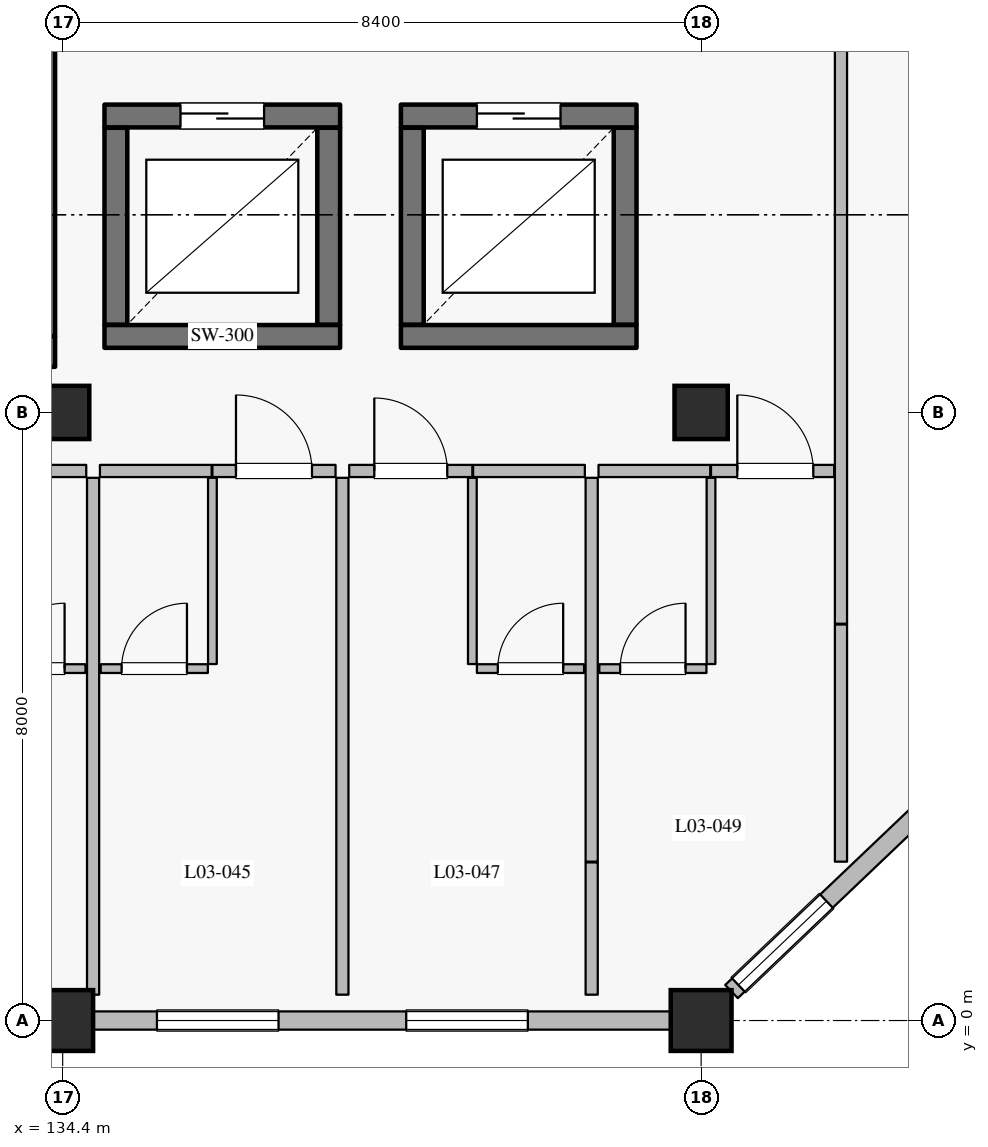
"""IFC4 building model, lengths in metres.
Left out: names, types, materials, properties, quantities, classifications, styles, units other than length and angle.
Written with IfcOpenShell. Run it as: python <this file> out.ifc"""

import sys

from ifc_helpers import new_model, si_unit, direction, frame, frame_2d, origin, origin_2d, place, context, subcontext, project, spatial, rectangle, extrude, element, fill, save


model = new_model("IFC4")
c1 = context("Model", 3, precision=1e-05, world=origin(), true_north=direction((0.0, 1.0)))
c2 = subcontext(c1, "Body", "Model", "MODEL_VIEW")
j1 = project(units=[si_unit("LENGTHUNIT", "METRE"), si_unit("PLANEANGLEUNIT", "RADIAN")], contexts=[c1])
p1 = place(None, origin())
s1 = spatial("IfcSite", under=j1, at=p1, CompositionType="ELEMENT")
p2 = place(p1, origin())
s2 = spatial("IfcBuilding", under=s1, at=p2, CompositionType="ELEMENT")
p3 = place(p2, frame((0.0, 0.0, 16.2)))
s3 = spatial("IfcBuildingStorey", under=s2, at=p3, CompositionType="ELEMENT", Elevation=16.2)
for number, where, z_axis, x_axis in (
    (1, (134.4, 0.0, 0.0), (0.0, 0.0, 1.0), (1.0, 0.0, 0.0)),
    (2, (142.8, 0.0, 0.0), (0.0, 0.0, 1.0), (1.0, 0.0, 0.0)),
):
    element("IfcColumn", number, at=place(p3, frame(where, z_axis=z_axis, x_axis=x_axis)), inside=s3, PredefinedType="COLUMN", context=c2, shape_type="SweptSolid", body=[
        extrude(rectangle(XDim=0.8, YDim=0.8, at=origin_2d()), origin(), (0.0, 0.0, 1.0), 4.8),
    ])
for number, where, z_axis, x_axis in (
    (3, (134.4, 8.0, 0.0), (0.0, 0.0, 1.0), (1.0, 0.0, 0.0)),
    (4, (142.8, 8.0, 0.0), (0.0, 0.0, 1.0), (1.0, 0.0, 0.0)),
):
    element("IfcColumn", number, at=place(p3, frame(where, z_axis=z_axis, x_axis=x_axis)), inside=s3, PredefinedType="COLUMN", context=c2, shape_type="SweptSolid", body=[
        extrude(rectangle(XDim=0.7, YDim=0.7, at=origin_2d()), origin(), (0.0, 0.0, 1.0), 4.8),
    ])
p4 = place(p3, frame((142.4, 0.0, 0.0), z_axis=(0.0, 0.0, 1.0), x_axis=(-1.0, 0.0, 0.0)))
e5 = element("IfcWall", 5, at=p4, inside=s3, PredefinedType="SOLIDWALL", context=c2, shape_type="SweptSolid", body=[
    extrude(rectangle(XDim=7.6, YDim=0.24, at=frame_2d((3.8, 0.0))), origin(), (0.0, 0.0, 1.0), 4.13),
])
p5 = place(p4, frame((1.88, 0.0, 0.8)))
e6 = element("IfcOpeningElement", 6, at=p5, cuts=e5, PredefinedType="OPENING", context=c2, shape_type="SweptSolid", body=[
    extrude(rectangle(XDim=1.6, YDim=1.6, at=frame_2d((0.8, 0.8))), frame((0.0, 0.13, 0.0), z_axis=(0.0, -1.0, 0.0), x_axis=(1.0, 0.0, 0.0)), (0.0, 0.0, 1.0), 0.26),
])
p6 = place(p4, frame((5.16, 0.0, 0.8)))
e7 = element("IfcOpeningElement", 7, at=p6, cuts=e5, PredefinedType="OPENING", context=c2, shape_type="SweptSolid", body=[
    extrude(rectangle(XDim=1.6, YDim=1.6, at=frame_2d((0.8, 0.8))), frame((0.0, 0.13, 0.0), z_axis=(0.0, -1.0, 0.0), x_axis=(1.0, 0.0, 0.0)), (0.0, 0.0, 1.0), 0.26),
])
p7 = place(p3, frame((150.8, 7.619, 0.0), z_axis=(0.0, 0.0, 1.0), x_axis=(-0.724156739794, -0.689635422677, 0.0)))
e8 = element("IfcWall", 8, at=p7, inside=s3, PredefinedType="SOLIDWALL", context=c2, shape_type="SweptSolid", body=[
    extrude(rectangle(XDim=10.495, YDim=0.24, at=frame_2d((5.248, 0.0))), origin(), (0.0, 0.0, 1.0), 4.13),
])
p8 = place(p7, frame((1.12, 0.0, 0.8)))
e9 = element("IfcOpeningElement", 9, at=p8, cuts=e8, PredefinedType="OPENING", context=c2, shape_type="SweptSolid", body=[
    extrude(rectangle(XDim=1.6, YDim=1.6, at=frame_2d((0.8, 0.8))), frame((0.0, 0.13, 0.0), z_axis=(0.0, -1.0, 0.0), x_axis=(1.0, 0.0, 0.0)), (0.0, 0.0, 1.0), 0.26),
])
p9 = place(p7, frame((5.442, 0.0, 0.8)))
e10 = element("IfcOpeningElement", 10, at=p9, cuts=e8, PredefinedType="OPENING", context=c2, shape_type="SweptSolid", body=[
    extrude(rectangle(XDim=1.6, YDim=1.6, at=frame_2d((0.8, 0.8))), frame((0.0, 0.13, 0.0), z_axis=(0.0, -1.0, 0.0), x_axis=(1.0, 0.0, 0.0)), (0.0, 0.0, 1.0), 0.26),
])
p10 = place(p7, frame((8.77, 0.0, 0.8)))
e11 = element("IfcOpeningElement", 11, at=p10, cuts=e8, PredefinedType="OPENING", context=c2, shape_type="SweptSolid", body=[
    extrude(rectangle(XDim=1.6, YDim=1.6, at=frame_2d((0.8, 0.8))), frame((0.0, 0.13, 0.0), z_axis=(0.0, -1.0, 0.0), x_axis=(1.0, 0.0, 0.0)), (0.0, 0.0, 1.0), 0.26),
])
p11 = place(p3, frame((134.95, 9.0, 0.0), z_axis=(0.0, 0.0, 1.0), x_axis=(1.0, 0.0, 0.0)))
e12 = element("IfcWall", 12, at=p11, inside=s3, PredefinedType="SHEAR", context=c2, shape_type="SweptSolid", body=[
    extrude(rectangle(XDim=3.1, YDim=0.3, at=frame_2d((1.55, 0.0))), origin(), (0.0, 0.0, 1.0), 4.535),
])
p12 = place(p3, frame((137.9, 9.155, 0.0), z_axis=(0.0, 0.0, 1.0), x_axis=(0.0, 1.0, 0.0)))
e13 = element("IfcWall", 13, at=p12, inside=s3, PredefinedType="SHEAR", context=c2, shape_type="SweptSolid", body=[
    extrude(rectangle(XDim=2.59, YDim=0.3, at=frame_2d((1.295, 0.0))), origin(), (0.0, 0.0, 1.0), 4.535),
])
p13 = place(p3, frame((138.05, 11.9, 0.0), z_axis=(0.0, 0.0, 1.0), x_axis=(-1.0, 0.0, 0.0)))
e14 = element("IfcWall", 14, at=p13, inside=s3, PredefinedType="SHEAR", context=c2, shape_type="SweptSolid", body=[
    extrude(rectangle(XDim=3.1, YDim=0.3, at=frame_2d((1.55, 0.0))), origin(), (0.0, 0.0, 1.0), 4.535),
])
p14 = place(p13, frame((1.0, 0.0, 0.0)))
e15 = element("IfcOpeningElement", 15, at=p14, cuts=e14, PredefinedType="OPENING", context=c2, shape_type="SweptSolid", body=[
    extrude(rectangle(XDim=1.1, YDim=2.2, at=frame_2d((0.55, 1.1))), frame((0.0, 0.16, 0.0), z_axis=(0.0, -1.0, 0.0), x_axis=(1.0, 0.0, 0.0)), (0.0, 0.0, 1.0), 0.32),
])
p15 = place(p3, frame((135.1, 11.745, 0.0), z_axis=(0.0, 0.0, 1.0), x_axis=(0.0, -1.0, 0.0)))
e16 = element("IfcWall", 16, at=p15, inside=s3, PredefinedType="SHEAR", context=c2, shape_type="SweptSolid", body=[
    extrude(rectangle(XDim=2.59, YDim=0.3, at=frame_2d((1.295, 0.0))), origin(), (0.0, 0.0, 1.0), 4.535),
])
p16 = place(p3, frame((138.85, 9.0, 0.0), z_axis=(0.0, 0.0, 1.0), x_axis=(1.0, 0.0, 0.0)))
e17 = element("IfcWall", 17, at=p16, inside=s3, PredefinedType="SHEAR", context=c2, shape_type="SweptSolid", body=[
    extrude(rectangle(XDim=3.1, YDim=0.3, at=frame_2d((1.55, 0.0))), origin(), (0.0, 0.0, 1.0), 4.535),
])
p17 = place(p3, frame((141.8, 9.155, 0.0), z_axis=(0.0, 0.0, 1.0), x_axis=(0.0, 1.0, 0.0)))
e18 = element("IfcWall", 18, at=p17, inside=s3, PredefinedType="SHEAR", context=c2, shape_type="SweptSolid", body=[
    extrude(rectangle(XDim=2.59, YDim=0.3, at=frame_2d((1.295, 0.0))), origin(), (0.0, 0.0, 1.0), 4.535),
])
p18 = place(p3, frame((141.95, 11.9, 0.0), z_axis=(0.0, 0.0, 1.0), x_axis=(-1.0, 0.0, 0.0)))
e19 = element("IfcWall", 19, at=p18, inside=s3, PredefinedType="SHEAR", context=c2, shape_type="SweptSolid", body=[
    extrude(rectangle(XDim=3.1, YDim=0.3, at=frame_2d((1.55, 0.0))), origin(), (0.0, 0.0, 1.0), 4.535),
])
p19 = place(p18, frame((1.0, 0.0, 0.0)))
e20 = element("IfcOpeningElement", 20, at=p19, cuts=e19, PredefinedType="OPENING", context=c2, shape_type="SweptSolid", body=[
    extrude(rectangle(XDim=1.1, YDim=2.2, at=frame_2d((0.55, 1.1))), frame((0.0, 0.16, 0.0), z_axis=(0.0, -1.0, 0.0), x_axis=(1.0, 0.0, 0.0)), (0.0, 0.0, 1.0), 0.32),
])
p20 = place(p3, frame((139.0, 11.745, 0.0), z_axis=(0.0, 0.0, 1.0), x_axis=(0.0, -1.0, 0.0)))
e21 = element("IfcWall", 21, at=p20, inside=s3, PredefinedType="SHEAR", context=c2, shape_type="SweptSolid", body=[
    extrude(rectangle(XDim=2.59, YDim=0.3, at=frame_2d((1.295, 0.0))), origin(), (0.0, 0.0, 1.0), 4.535),
])
p21 = place(p3, frame((126.1, 8.8, 0.0), z_axis=(0.0, 0.0, 1.0), x_axis=(1.0, 0.0, 0.0)))
e22 = element("IfcWall", 22, at=p21, inside=s3, PredefinedType="SHEAR", context=c2, shape_type="SweptSolid", body=[
    extrude(rectangle(XDim=8.2, YDim=0.4, at=frame_2d((4.1, 0.0))), origin(), (0.0, 0.0, 1.0), 4.535),
])
p22 = place(p3, frame((134.1, 9.005, 0.0), z_axis=(0.0, 0.0, 1.0), x_axis=(0.0, 1.0, 0.0)))
e23 = element("IfcWall", 23, at=p22, inside=s3, PredefinedType="SHEAR", context=c2, shape_type="SweptSolid", body=[
    extrude(rectangle(XDim=3.95, YDim=0.4, at=frame_2d((1.975, 0.0))), origin(), (0.0, 0.0, 1.0), 4.535),
])
p23 = place(p3, frame((133.24, 7.23, 0.0), z_axis=(0.0, 0.0, 1.0), x_axis=(1.0, 0.0, 0.0)))
e24 = element("IfcWall", 24, at=p23, inside=s3, PredefinedType="PARTITIONING", context=c2, shape_type="SweptSolid", body=[
    extrude(rectangle(XDim=1.47, YDim=0.16, at=frame_2d((0.735, 0.0))), origin(), (0.0, 0.0, 1.0), 4.535),
])
p24 = place(p3, frame((133.29, 4.63, 0.0), z_axis=(0.0, 0.0, 1.0), x_axis=(1.0, 0.0, 0.0)))
e25 = element("IfcWall", 25, at=p24, inside=s3, PredefinedType="PARTITIONING", context=c2, shape_type="SweptSolid", body=[
    extrude(rectangle(XDim=1.41, YDim=0.115, at=frame_2d((0.705, 0.0))), origin(), (0.0, 0.0, 1.0), 4.535),
])
p25 = place(p24, frame((0.275, 0.0, 0.0)))
e26 = element("IfcOpeningElement", 26, at=p25, cuts=e25, PredefinedType="OPENING", context=c2, shape_type="SweptSolid", body=[
    extrude(rectangle(XDim=0.86, YDim=2.12, at=frame_2d((0.43, 1.06))), frame((0.0, 0.067, 0.0), z_axis=(0.0, -1.0, 0.0), x_axis=(1.0, 0.0, 0.0)), (0.0, 0.0, 1.0), 0.135),
])
p26 = place(p3, frame((134.89, 7.23, 0.0), z_axis=(0.0, 0.0, 1.0), x_axis=(1.0, 0.0, 0.0)))
e27 = element("IfcWall", 27, at=p26, inside=s3, PredefinedType="PARTITIONING", context=c2, shape_type="SweptSolid", body=[
    extrude(rectangle(XDim=1.47, YDim=0.16, at=frame_2d((0.735, 0.0))), origin(), (0.0, 0.0, 1.0), 4.535),
])
p27 = place(p3, frame((136.37, 7.23, 0.0), z_axis=(0.0, 0.0, 1.0), x_axis=(1.0, 0.0, 0.0)))
e28 = element("IfcWall", 28, at=p27, inside=s3, PredefinedType="PARTITIONING", context=c2, shape_type="SweptSolid", body=[
    extrude(rectangle(XDim=1.62, YDim=0.16, at=frame_2d((0.81, 0.0))), origin(), (0.0, 0.0, 1.0), 4.535),
])
p28 = place(p27, frame((0.31, 0.0, 0.0)))
e29 = element("IfcOpeningElement", 29, at=p28, cuts=e28, PredefinedType="OPENING", context=c2, shape_type="SweptSolid", body=[
    extrude(rectangle(XDim=1.0, YDim=2.25, at=frame_2d((0.5, 1.125))), frame((0.0, 0.09, 0.0), z_axis=(0.0, -1.0, 0.0), x_axis=(1.0, 0.0, 0.0)), (0.0, 0.0, 1.0), 0.18),
])
p29 = place(p3, frame((136.37, 4.69, 0.0), z_axis=(0.0, 0.0, 1.0), x_axis=(0.0, 1.0, 0.0)))
e30 = element("IfcWall", 30, at=p29, inside=s3, PredefinedType="PARTITIONING", context=c2, shape_type="SweptSolid", body=[
    extrude(rectangle(XDim=2.45, YDim=0.115, at=frame_2d((1.225, 0.0))), origin(), (0.0, 0.0, 1.0), 4.535),
])
p30 = place(p3, frame((134.9, 4.63, 0.0), z_axis=(0.0, 0.0, 1.0), x_axis=(1.0, 0.0, 0.0)))
e31 = element("IfcWall", 31, at=p30, inside=s3, PredefinedType="PARTITIONING", context=c2, shape_type="SweptSolid", body=[
    extrude(rectangle(XDim=1.41, YDim=0.115, at=frame_2d((0.705, 0.0))), origin(), (0.0, 0.0, 1.0), 4.535),
])
p31 = place(p30, frame((0.275, 0.0, 0.0)))
e32 = element("IfcOpeningElement", 32, at=p31, cuts=e31, PredefinedType="OPENING", context=c2, shape_type="SweptSolid", body=[
    extrude(rectangle(XDim=0.86, YDim=2.12, at=frame_2d((0.43, 1.06))), frame((0.0, 0.067, 0.0), z_axis=(0.0, -1.0, 0.0), x_axis=(1.0, 0.0, 0.0)), (0.0, 0.0, 1.0), 0.135),
])
p32 = place(p3, frame((134.8, 0.34, 0.0), z_axis=(0.0, 0.0, 1.0), x_axis=(0.0, 1.0, 0.0)))
e33 = element("IfcWall", 33, at=p32, inside=s3, PredefinedType="PARTITIONING", context=c2, shape_type="SweptSolid", body=[
    extrude(rectangle(XDim=6.8, YDim=0.16, at=frame_2d((3.4, 0.0))), origin(), (0.0, 0.0, 1.0), 4.535),
])
p33 = place(p3, frame((138.17, 7.23, 0.0), z_axis=(0.0, 0.0, 1.0), x_axis=(1.0, 0.0, 0.0)))
e34 = element("IfcWall", 34, at=p33, inside=s3, PredefinedType="PARTITIONING", context=c2, shape_type="SweptSolid", body=[
    extrude(rectangle(XDim=1.62, YDim=0.16, at=frame_2d((0.81, 0.0))), origin(), (0.0, 0.0, 1.0), 4.535),
])
p34 = place(p33, frame((0.33, 0.0, 0.0)))
e35 = element("IfcOpeningElement", 35, at=p34, cuts=e34, PredefinedType="OPENING", context=c2, shape_type="SweptSolid", body=[
    extrude(rectangle(XDim=0.96, YDim=2.2, at=frame_2d((0.48, 1.1))), frame((0.0, 0.09, 0.0), z_axis=(0.0, -1.0, 0.0), x_axis=(1.0, 0.0, 0.0)), (0.0, 0.0, 1.0), 0.18),
])
p35 = place(p3, frame((139.8, 7.23, 0.0), z_axis=(0.0, 0.0, 1.0), x_axis=(1.0, 0.0, 0.0)))
e36 = element("IfcWall", 36, at=p35, inside=s3, PredefinedType="PARTITIONING", context=c2, shape_type="SweptSolid", body=[
    extrude(rectangle(XDim=1.47, YDim=0.16, at=frame_2d((0.735, 0.0))), origin(), (0.0, 0.0, 1.0), 4.535),
])
p36 = place(p3, frame((139.79, 4.69, 0.0), z_axis=(0.0, 0.0, 1.0), x_axis=(0.0, 1.0, 0.0)))
e37 = element("IfcWall", 37, at=p36, inside=s3, PredefinedType="PARTITIONING", context=c2, shape_type="SweptSolid", body=[
    extrude(rectangle(XDim=2.45, YDim=0.115, at=frame_2d((1.225, 0.0))), origin(), (0.0, 0.0, 1.0), 4.535),
])
p37 = place(p3, frame((139.85, 4.63, 0.0), z_axis=(0.0, 0.0, 1.0), x_axis=(1.0, 0.0, 0.0)))
e38 = element("IfcWall", 38, at=p37, inside=s3, PredefinedType="PARTITIONING", context=c2, shape_type="SweptSolid", body=[
    extrude(rectangle(XDim=1.41, YDim=0.115, at=frame_2d((0.705, 0.0))), origin(), (0.0, 0.0, 1.0), 4.535),
])
p38 = place(p37, frame((0.275, 0.0, 0.0)))
e39 = element("IfcOpeningElement", 39, at=p38, cuts=e38, PredefinedType="OPENING", context=c2, shape_type="SweptSolid", body=[
    extrude(rectangle(XDim=0.86, YDim=2.12, at=frame_2d((0.43, 1.06))), frame((0.0, 0.067, 0.0), z_axis=(0.0, -1.0, 0.0), x_axis=(1.0, 0.0, 0.0)), (0.0, 0.0, 1.0), 0.135),
])
p39 = place(p3, frame((138.08, 0.34, 0.0), z_axis=(0.0, 0.0, 1.0), x_axis=(0.0, 1.0, 0.0)))
e40 = element("IfcWall", 40, at=p39, inside=s3, PredefinedType="PARTITIONING", context=c2, shape_type="SweptSolid", body=[
    extrude(rectangle(XDim=6.8, YDim=0.16, at=frame_2d((3.4, 0.0))), origin(), (0.0, 0.0, 1.0), 4.535),
])
p40 = place(p3, frame((141.36, 0.34, 0.0), z_axis=(0.0, 0.0, 1.0), x_axis=(0.0, 1.0, 0.0)))
e41 = element("IfcWall", 41, at=p40, inside=s3, PredefinedType="PARTITIONING", context=c2, shape_type="SweptSolid", body=[
    extrude(rectangle(XDim=1.74, YDim=0.16, at=frame_2d((0.87, 0.0))), origin(), (0.0, 0.0, 1.0), 4.535),
])
p41 = place(p3, frame((141.45, 7.23, 0.0), z_axis=(0.0, 0.0, 1.0), x_axis=(1.0, 0.0, 0.0)))
e42 = element("IfcWall", 42, at=p41, inside=s3, PredefinedType="PARTITIONING", context=c2, shape_type="SweptSolid", body=[
    extrude(rectangle(XDim=1.47, YDim=0.16, at=frame_2d((0.735, 0.0))), origin(), (0.0, 0.0, 1.0), 4.535),
])
p42 = place(p3, frame((142.93, 7.23, 0.0), z_axis=(0.0, 0.0, 1.0), x_axis=(1.0, 0.0, 0.0)))
e43 = element("IfcWall", 43, at=p42, inside=s3, PredefinedType="PARTITIONING", context=c2, shape_type="SweptSolid", body=[
    extrude(rectangle(XDim=1.62, YDim=0.16, at=frame_2d((0.81, 0.0))), origin(), (0.0, 0.0, 1.0), 4.535),
])
p43 = place(p42, frame((0.346, 0.0, 0.0)))
e44 = element("IfcOpeningElement", 44, at=p43, cuts=e43, PredefinedType="OPENING", context=c2, shape_type="SweptSolid", body=[
    extrude(rectangle(XDim=1.0, YDim=2.25, at=frame_2d((0.5, 1.125))), frame((0.0, 0.09, 0.0), z_axis=(0.0, -1.0, 0.0), x_axis=(1.0, 0.0, 0.0)), (0.0, 0.0, 1.0), 0.18),
])
p44 = place(p3, frame((142.93, 4.69, 0.0), z_axis=(0.0, 0.0, 1.0), x_axis=(0.0, 1.0, 0.0)))
e45 = element("IfcWall", 45, at=p44, inside=s3, PredefinedType="PARTITIONING", context=c2, shape_type="SweptSolid", body=[
    extrude(rectangle(XDim=2.45, YDim=0.115, at=frame_2d((1.225, 0.0))), origin(), (0.0, 0.0, 1.0), 4.535),
])
p45 = place(p3, frame((141.46, 4.63, 0.0), z_axis=(0.0, 0.0, 1.0), x_axis=(1.0, 0.0, 0.0)))
e46 = element("IfcWall", 46, at=p45, inside=s3, PredefinedType="PARTITIONING", context=c2, shape_type="SweptSolid", body=[
    extrude(rectangle(XDim=1.41, YDim=0.115, at=frame_2d((0.705, 0.0))), origin(), (0.0, 0.0, 1.0), 4.535),
])
p46 = place(p45, frame((0.275, 0.0, 0.0)))
e47 = element("IfcOpeningElement", 47, at=p46, cuts=e46, PredefinedType="OPENING", context=c2, shape_type="SweptSolid", body=[
    extrude(rectangle(XDim=0.86, YDim=2.12, at=frame_2d((0.43, 1.06))), frame((0.0, 0.067, 0.0), z_axis=(0.0, -1.0, 0.0), x_axis=(1.0, 0.0, 0.0)), (0.0, 0.0, 1.0), 0.135),
])
p47 = place(p3, frame((141.36, 2.09, 0.0), z_axis=(0.0, 0.0, 1.0), x_axis=(0.0, 1.0, 0.0)))
e48 = element("IfcWall", 48, at=p47, inside=s3, PredefinedType="PARTITIONING", context=c2, shape_type="SweptSolid", body=[
    extrude(rectangle(XDim=5.05, YDim=0.16, at=frame_2d((2.525, 0.0))), origin(), (0.0, 0.0, 1.0), 4.535),
])
p48 = place(p3, frame((144.64, 2.09, 0.0), z_axis=(0.0, 0.0, 1.0), x_axis=(0.0, 1.0, 0.0)))
e49 = element("IfcWall", 49, at=p48, inside=s3, PredefinedType="PARTITIONING", context=c2, shape_type="SweptSolid", body=[
    extrude(rectangle(XDim=3.12, YDim=0.16, at=frame_2d((1.56, 0.0))), origin(), (0.0, 0.0, 1.0), 4.535),
])
p49 = place(p3, frame((144.64, 5.22, 0.0), z_axis=(0.0, 0.0, 1.0), x_axis=(0.0, 1.0, 0.0)))
e50 = element("IfcWall", 50, at=p49, inside=s3, PredefinedType="PARTITIONING", context=c2, shape_type="SweptSolid", body=[
    extrude(rectangle(XDim=9.32, YDim=0.16, at=frame_2d((4.66, 0.0))), origin(), (0.0, 0.0, 1.0), 4.535),
])
p50 = place(p5, origin())
e51 = element("IfcWindow", 51, at=p50, inside=s3, PartitioningType="SINGLE_PANEL", PredefinedType="WINDOW", context=c2, shape_type="SweptSolid", body=[
    extrude(rectangle(XDim=1.6, YDim=1.6, at=frame_2d((0.8, 0.8))), frame((0.0, 0.03, 0.0), z_axis=(0.0, -1.0, 0.0), x_axis=(1.0, 0.0, 0.0)), (0.0, 0.0, 1.0), 0.06),
])
fill(e6, e51)
p51 = place(p6, origin())
e52 = element("IfcWindow", 52, at=p51, inside=s3, PartitioningType="SINGLE_PANEL", PredefinedType="WINDOW", context=c2, shape_type="SweptSolid", body=[
    extrude(rectangle(XDim=1.6, YDim=1.6, at=frame_2d((0.8, 0.8))), frame((0.0, 0.03, 0.0), z_axis=(0.0, -1.0, 0.0), x_axis=(1.0, 0.0, 0.0)), (0.0, 0.0, 1.0), 0.06),
])
fill(e7, e52)
p52 = place(p10, origin())
e53 = element("IfcWindow", 53, at=p52, inside=s3, PartitioningType="SINGLE_PANEL", PredefinedType="WINDOW", context=c2, shape_type="SweptSolid", body=[
    extrude(rectangle(XDim=1.6, YDim=1.6, at=frame_2d((0.8, 0.8))), frame((0.0, 0.03, 0.0), z_axis=(0.0, -1.0, 0.0), x_axis=(1.0, 0.0, 0.0)), (0.0, 0.0, 1.0), 0.06),
])
fill(e11, e53)
p53 = place(p14, origin())
e54 = element("IfcDoor", 54, at=p53, inside=s3, OperationType="DOUBLE_DOOR_SLIDING", PredefinedType="DOOR", context=c2, shape_type="SweptSolid", body=[
    extrude(rectangle(XDim=1.1, YDim=2.2, at=frame_2d((0.55, 1.1))), frame((0.0, 0.025, 0.0), z_axis=(0.0, -1.0, 0.0), x_axis=(1.0, 0.0, 0.0)), (0.0, 0.0, 1.0), 0.05),
])
fill(e15, e54)
p54 = place(p19, origin())
e55 = element("IfcDoor", 55, at=p54, inside=s3, OperationType="DOUBLE_DOOR_SLIDING", PredefinedType="DOOR", context=c2, shape_type="SweptSolid", body=[
    extrude(rectangle(XDim=1.1, YDim=2.2, at=frame_2d((0.55, 1.1))), frame((0.0, 0.025, 0.0), z_axis=(0.0, -1.0, 0.0), x_axis=(1.0, 0.0, 0.0)), (0.0, 0.0, 1.0), 0.05),
])
fill(e20, e55)
p55 = place(p25, origin())
e56 = element("IfcDoor", 56, at=p55, inside=s3, OperationType="SINGLE_SWING_RIGHT", PredefinedType="DOOR", context=c2, shape_type="SweptSolid", body=[
    extrude(rectangle(XDim=0.86, YDim=2.12, at=frame_2d((0.43, 1.06))), frame((0.0, 0.025, 0.0), z_axis=(0.0, -1.0, 0.0), x_axis=(1.0, 0.0, 0.0)), (0.0, 0.0, 1.0), 0.05),
])
fill(e26, e56)
p56 = place(p28, origin())
e57 = element("IfcDoor", 57, at=p56, inside=s3, OperationType="SINGLE_SWING_LEFT", PredefinedType="DOOR", context=c2, shape_type="SweptSolid", body=[
    extrude(rectangle(XDim=1.0, YDim=2.25, at=frame_2d((0.5, 1.125))), frame((0.0, 0.025, 0.0), z_axis=(0.0, -1.0, 0.0), x_axis=(1.0, 0.0, 0.0)), (0.0, 0.0, 1.0), 0.05),
])
fill(e29, e57)
p57 = place(p31, origin())
e58 = element("IfcDoor", 58, at=p57, inside=s3, OperationType="SINGLE_SWING_RIGHT", PredefinedType="DOOR", context=c2, shape_type="SweptSolid", body=[
    extrude(rectangle(XDim=0.86, YDim=2.12, at=frame_2d((0.43, 1.06))), frame((0.0, 0.025, 0.0), z_axis=(0.0, -1.0, 0.0), x_axis=(1.0, 0.0, 0.0)), (0.0, 0.0, 1.0), 0.05),
])
fill(e32, e58)
p58 = place(p34, origin())
e59 = element("IfcDoor", 59, at=p58, inside=s3, OperationType="SINGLE_SWING_LEFT", PredefinedType="DOOR", context=c2, shape_type="SweptSolid", body=[
    extrude(rectangle(XDim=0.96, YDim=2.2, at=frame_2d((0.48, 1.1))), frame((0.0, 0.025, 0.0), z_axis=(0.0, -1.0, 0.0), x_axis=(1.0, 0.0, 0.0)), (0.0, 0.0, 1.0), 0.05),
])
fill(e35, e59)
p59 = place(p38, origin())
e60 = element("IfcDoor", 60, at=p59, inside=s3, OperationType="SINGLE_SWING_RIGHT", PredefinedType="DOOR", context=c2, shape_type="SweptSolid", body=[
    extrude(rectangle(XDim=0.86, YDim=2.12, at=frame_2d((0.43, 1.06))), frame((0.0, 0.025, 0.0), z_axis=(0.0, -1.0, 0.0), x_axis=(1.0, 0.0, 0.0)), (0.0, 0.0, 1.0), 0.05),
])
fill(e39, e60)
p60 = place(p43, origin())
e61 = element("IfcDoor", 61, at=p60, inside=s3, OperationType="SINGLE_SWING_LEFT", PredefinedType="DOOR", context=c2, shape_type="SweptSolid", body=[
    extrude(rectangle(XDim=1.0, YDim=2.25, at=frame_2d((0.5, 1.125))), frame((0.0, 0.025, 0.0), z_axis=(0.0, -1.0, 0.0), x_axis=(1.0, 0.0, 0.0)), (0.0, 0.0, 1.0), 0.05),
])
fill(e44, e61)
p61 = place(p46, origin())
e62 = element("IfcDoor", 62, at=p61, inside=s3, OperationType="SINGLE_SWING_RIGHT", PredefinedType="DOOR", context=c2, shape_type="SweptSolid", body=[
    extrude(rectangle(XDim=0.86, YDim=2.12, at=frame_2d((0.43, 1.06))), frame((0.0, 0.025, 0.0), z_axis=(0.0, -1.0, 0.0), x_axis=(1.0, 0.0, 0.0)), (0.0, 0.0, 1.0), 0.05),
])
fill(e47, e62)
save(model, sys.argv[1])
